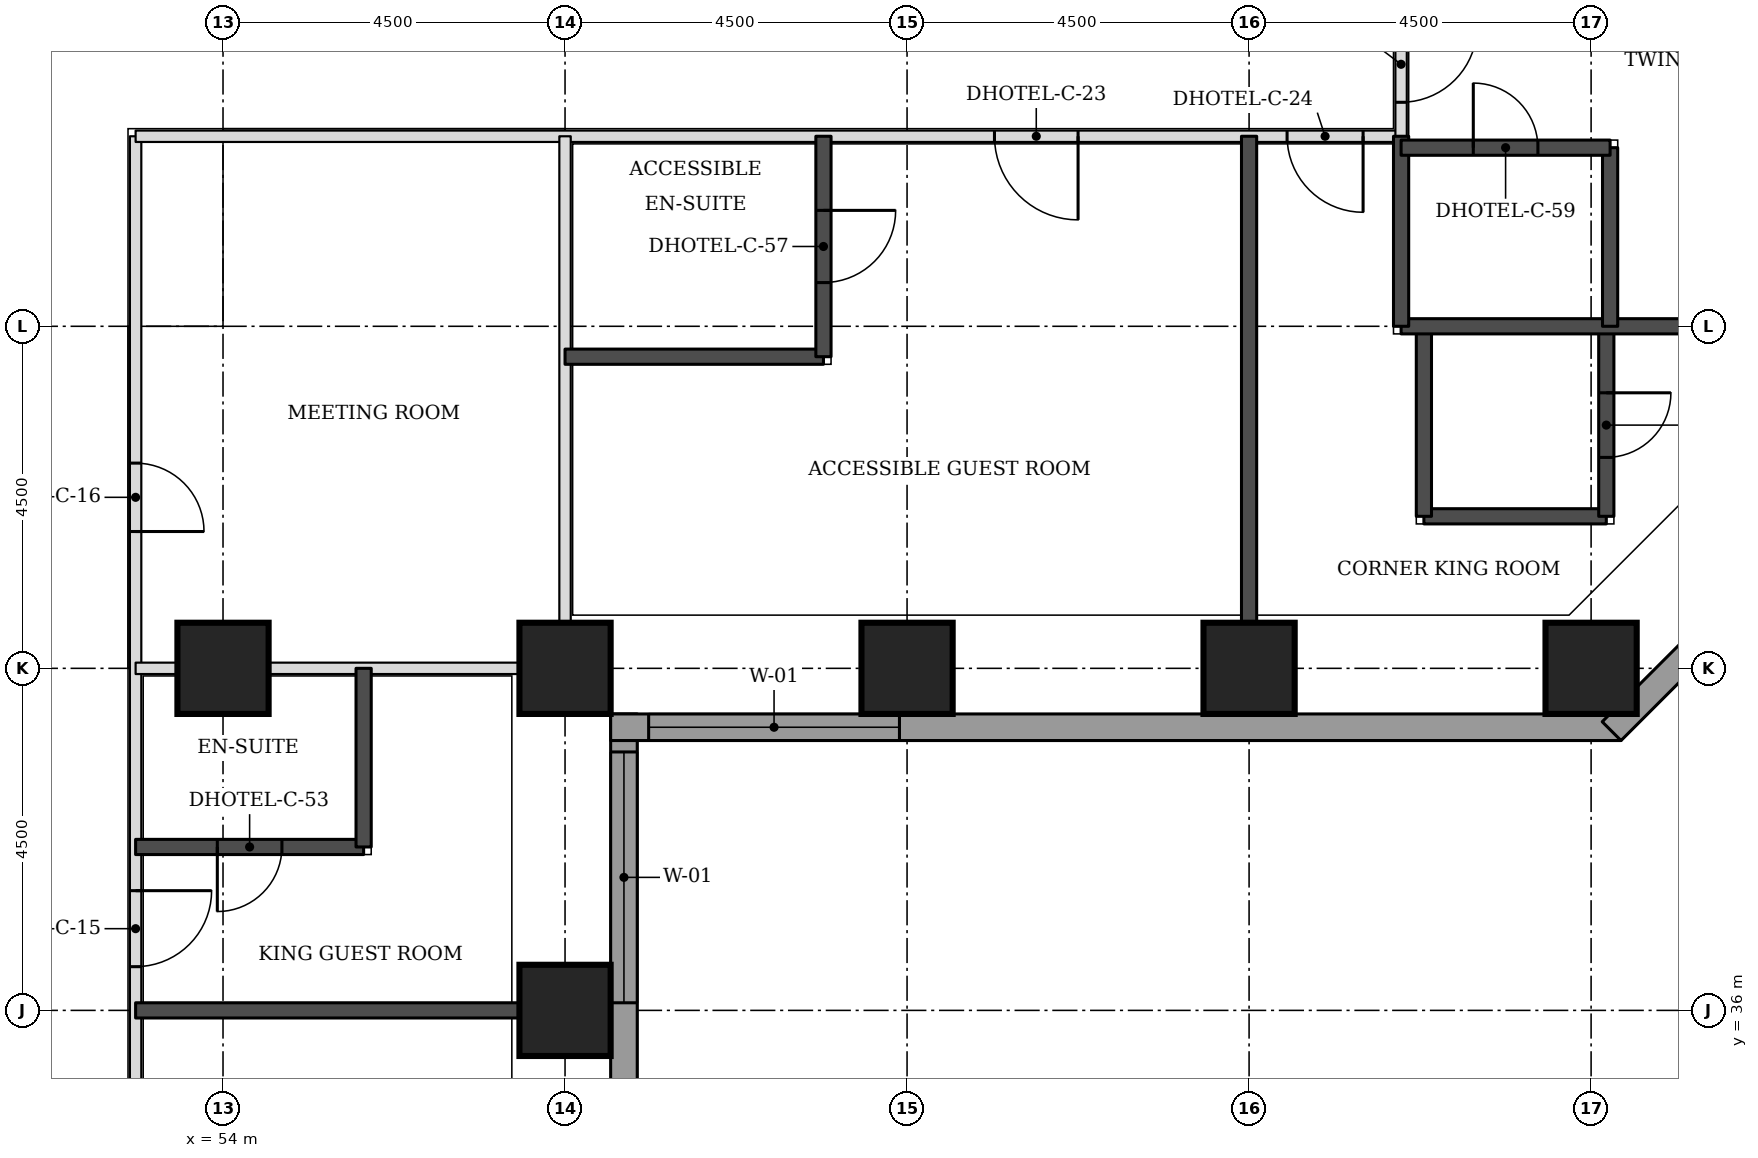
"""IFC4 building model, lengths in metres.
Left out: names, types, materials, properties, quantities, classifications, styles, units other than length and angle.
Written with IfcOpenShell. Run it as: python <this file> out.ifc"""

import sys

from ifc_helpers import new_model, si_unit, direction, frame, frame_2d, origin, origin_2d, place, context, subcontext, project, spatial, rectangle, extrude, element, fill, save


model = new_model("IFC4")
c1 = context("Model", 3, precision=1e-05, world=origin(), true_north=direction((0.0, 1.0)))
c2 = subcontext(c1, "Body", "Model", "MODEL_VIEW")
j1 = project(units=[si_unit("LENGTHUNIT", "METRE"), si_unit("PLANEANGLEUNIT", "RADIAN")], contexts=[c1])
p1 = place(None, origin())
s1 = spatial("IfcSite", under=j1, at=p1, CompositionType="ELEMENT")
p2 = place(p1, origin())
s2 = spatial("IfcBuilding", under=s1, at=p2, CompositionType="ELEMENT")
p3 = place(p2, frame((0.0, 0.0, 56.1)))
s3 = spatial("IfcBuildingStorey", under=s2, at=p3, CompositionType="ELEMENT", Elevation=56.1)
for number, where, z_axis, x_axis in (
    (1, (58.5, 36.0, 0.0), (0.0, 0.0, 1.0), (1.0, 0.0, 0.0)),
    (2, (54.0, 40.5, 0.0), (0.0, 0.0, 1.0), (1.0, 0.0, 0.0)),
    (3, (58.5, 40.5, 0.0), (0.0, 0.0, 1.0), (1.0, 0.0, 0.0)),
    (4, (63.0, 40.5, 0.0), (0.0, 0.0, 1.0), (1.0, 0.0, 0.0)),
    (5, (67.5, 40.5, 0.0), (0.0, 0.0, 1.0), (1.0, 0.0, 0.0)),
    (6, (72.0, 40.5, 0.0), (0.0, 0.0, 1.0), (1.0, 0.0, 0.0)),
):
    element("IfcColumn", number, at=place(p3, frame(where, z_axis=z_axis, x_axis=x_axis)), inside=s3, PredefinedType="COLUMN", context=c2, shape_type="SweptSolid", body=[
        extrude(rectangle(XDim=1.2, YDim=1.2, at=origin_2d()), origin(), (0.0, 0.0, 1.0), 3.3),
    ])
p4 = place(p3, frame((59.275, 22.106, 0.0), z_axis=(0.0, 0.0, 1.0), x_axis=(0.0, 1.0, 0.0)))
e7 = element("IfcWall", 7, at=p4, inside=s3, PredefinedType="STANDARD", context=c2, shape_type="SweptSolid", body=[
    extrude(rectangle(XDim=17.793, YDim=0.35, at=frame_2d((8.897, 0.0))), origin(), (0.0, 0.0, 1.0), 3.055),
])
p5 = place(p4, frame((5.493, 0.0, 0.8)))
e8 = element("IfcOpeningElement", 8, at=p5, cuts=e7, PredefinedType="OPENING", context=c2, shape_type="SweptSolid", body=[
    extrude(rectangle(XDim=3.3, YDim=1.5, at=frame_2d((1.65, 0.75))), frame((0.0, 0.185, 0.0), z_axis=(0.0, -1.0, 0.0), x_axis=(1.0, 0.0, 0.0)), (0.0, 0.0, 1.0), 0.37),
])
p6 = place(p4, frame((13.993, 0.0, 0.8)))
e9 = element("IfcOpeningElement", 9, at=p6, cuts=e7, PredefinedType="OPENING", context=c2, shape_type="SweptSolid", body=[
    extrude(rectangle(XDim=3.3, YDim=1.5, at=frame_2d((1.65, 0.75))), frame((0.0, 0.185, 0.0), z_axis=(0.0, -1.0, 0.0), x_axis=(1.0, 0.0, 0.0)), (0.0, 0.0, 1.0), 0.37),
])
p7 = place(p3, frame((59.1, 39.725, 0.0), z_axis=(0.0, 0.0, 1.0), x_axis=(1.0, 0.0, 0.0)))
e10 = element("IfcWall", 10, at=p7, inside=s3, PredefinedType="STANDARD", context=c2, shape_type="SweptSolid", body=[
    extrude(rectangle(XDim=13.293, YDim=0.35, at=frame_2d((6.647, 0.0))), origin(), (0.0, 0.0, 1.0), 3.055),
])
p8 = place(p7, frame((0.5, 0.0, 0.8)))
e11 = element("IfcOpeningElement", 11, at=p8, cuts=e10, PredefinedType="OPENING", context=c2, shape_type="SweptSolid", body=[
    extrude(rectangle(XDim=3.3, YDim=1.5, at=frame_2d((1.65, 0.75))), frame((0.0, 0.185, 0.0), z_axis=(0.0, -1.0, 0.0), x_axis=(1.0, 0.0, 0.0)), (0.0, 0.0, 1.0), 0.37),
])
p9 = place(p3, frame((72.27, 39.674, 0.0), z_axis=(0.0, 0.0, 1.0), x_axis=(0.707106781187, 0.707106781187, 0.0)))
e12 = element("IfcWall", 12, at=p9, inside=s3, PredefinedType="STANDARD", context=c2, shape_type="SweptSolid", body=[
    extrude(rectangle(XDim=7.151, YDim=0.35, at=frame_2d((3.576, 0.0))), origin(), (0.0, 0.0, 1.0), 3.055),
])
p10 = place(p9, frame((1.926, 0.0, 0.8)))
e13 = element("IfcOpeningElement", 13, at=p10, cuts=e12, PredefinedType="OPENING", context=c2, shape_type="SweptSolid", body=[
    extrude(rectangle(XDim=3.3, YDim=1.5, at=frame_2d((1.65, 0.75))), frame((0.0, 0.185, 0.0), z_axis=(0.0, -1.0, 0.0), x_axis=(1.0, 0.0, 0.0)), (0.0, 0.0, 1.0), 0.37),
])
p11 = place(p3, frame((52.85, 25.15, 0.0), z_axis=(0.0, 0.0, 1.0), x_axis=(0.0, 1.0, 0.0)))
e14 = element("IfcWall", 14, at=p11, inside=s3, PredefinedType="PARTITIONING", context=c2, shape_type="SweptSolid", body=[
    extrude(rectangle(XDim=22.35, YDim=0.15, at=frame_2d((11.175, 0.0))), origin(), (0.0, 0.0, 1.0), 3.08),
])
p12 = place(p11, frame((0.347, 0.0, 0.0)))
e15 = element("IfcOpeningElement", 15, at=p12, cuts=e14, PredefinedType="OPENING", context=c2, shape_type="SweptSolid", body=[
    extrude(rectangle(XDim=1.0, YDim=2.1, at=frame_2d((0.5, 1.05))), frame((0.0, 0.085, 0.0), z_axis=(0.0, -1.0, 0.0), x_axis=(1.0, 0.0, 0.0)), (0.0, 0.0, 1.0), 0.17),
])
p13 = place(p11, frame((7.075, 0.0, 0.0)))
e16 = element("IfcOpeningElement", 16, at=p13, cuts=e14, PredefinedType="OPENING", context=c2, shape_type="SweptSolid", body=[
    extrude(rectangle(XDim=1.0, YDim=2.1, at=frame_2d((0.5, 1.05))), frame((0.0, 0.085, 0.0), z_axis=(0.0, -1.0, 0.0), x_axis=(1.0, 0.0, 0.0)), (0.0, 0.0, 1.0), 0.17),
])
p14 = place(p11, frame((11.425, 0.0, 0.0)))
e17 = element("IfcOpeningElement", 17, at=p14, cuts=e14, PredefinedType="OPENING", context=c2, shape_type="SweptSolid", body=[
    extrude(rectangle(XDim=1.0, YDim=2.1, at=frame_2d((0.5, 1.05))), frame((0.0, 0.085, 0.0), z_axis=(0.0, -1.0, 0.0), x_axis=(1.0, 0.0, 0.0)), (0.0, 0.0, 1.0), 0.17),
])
p15 = place(p11, frame((17.15, 0.0, 0.0)))
e18 = element("IfcOpeningElement", 18, at=p15, cuts=e14, PredefinedType="OPENING", context=c2, shape_type="SweptSolid", body=[
    extrude(rectangle(XDim=0.9, YDim=2.1, at=frame_2d((0.45, 1.05))), frame((0.0, 0.085, 0.0), z_axis=(0.0, -1.0, 0.0), x_axis=(1.0, 0.0, 0.0)), (0.0, 0.0, 1.0), 0.17),
])
p16 = place(p3, frame((52.85, 47.5, 0.0), z_axis=(0.0, 0.0, 1.0), x_axis=(1.0, 0.0, 0.0)))
e19 = element("IfcWall", 19, at=p16, inside=s3, PredefinedType="PARTITIONING", context=c2, shape_type="SweptSolid", body=[
    extrude(rectangle(XDim=16.65, YDim=0.15, at=frame_2d((8.325, 0.0))), origin(), (0.0, 0.0, 1.0), 3.08),
])
p17 = place(p16, frame((11.3, 0.0, 0.0)))
e20 = element("IfcOpeningElement", 20, at=p17, cuts=e19, PredefinedType="OPENING", context=c2, shape_type="SweptSolid", body=[
    extrude(rectangle(XDim=1.1, YDim=2.1, at=frame_2d((0.55, 1.05))), frame((0.0, 0.085, 0.0), z_axis=(0.0, -1.0, 0.0), x_axis=(1.0, 0.0, 0.0)), (0.0, 0.0, 1.0), 0.17),
])
p18 = place(p16, frame((15.15, 0.0, 0.0)))
e21 = element("IfcOpeningElement", 21, at=p18, cuts=e19, PredefinedType="OPENING", context=c2, shape_type="SweptSolid", body=[
    extrude(rectangle(XDim=1.0, YDim=2.1, at=frame_2d((0.5, 1.05))), frame((0.0, 0.085, 0.0), z_axis=(0.0, -1.0, 0.0), x_axis=(1.0, 0.0, 0.0)), (0.0, 0.0, 1.0), 0.17),
])
p19 = place(p3, frame((69.5, 47.5, 0.0), z_axis=(0.0, 0.0, 1.0), x_axis=(0.0, 1.0, 0.0)))
e22 = element("IfcWall", 22, at=p19, inside=s3, PredefinedType="PARTITIONING", context=c2, shape_type="SweptSolid", body=[
    extrude(rectangle(XDim=26.5, YDim=0.15, at=frame_2d((13.25, 0.0))), origin(), (0.0, 0.0, 1.0), 3.08),
])
p20 = place(p19, frame((25.053, 0.0, 0.0)))
e23 = element("IfcOpeningElement", 23, at=p20, cuts=e22, PredefinedType="OPENING", context=c2, shape_type="SweptSolid", body=[
    extrude(rectangle(XDim=1.0, YDim=2.1, at=frame_2d((0.5, 1.05))), frame((0.0, 0.085, 0.0), z_axis=(0.0, -1.0, 0.0), x_axis=(1.0, 0.0, 0.0)), (0.0, 0.0, 1.0), 0.17),
])
p21 = place(p19, frame((18.275, 0.0, 0.0)))
e24 = element("IfcOpeningElement", 24, at=p21, cuts=e22, PredefinedType="OPENING", context=c2, shape_type="SweptSolid", body=[
    extrude(rectangle(XDim=1.0, YDim=2.1, at=frame_2d((0.5, 1.05))), frame((0.0, 0.085, 0.0), z_axis=(0.0, -1.0, 0.0), x_axis=(1.0, 0.0, 0.0)), (0.0, 0.0, 1.0), 0.17),
])
p22 = place(p19, frame((12.15, 0.0, 0.0)))
e25 = element("IfcOpeningElement", 25, at=p22, cuts=e22, PredefinedType="OPENING", context=c2, shape_type="SweptSolid", body=[
    extrude(rectangle(XDim=1.1, YDim=2.1, at=frame_2d((0.55, 1.05))), frame((0.0, 0.085, 0.0), z_axis=(0.0, -1.0, 0.0), x_axis=(1.0, 0.0, 0.0)), (0.0, 0.0, 1.0), 0.17),
])
p23 = place(p19, frame((2.825, 0.0, 0.0)))
e26 = element("IfcOpeningElement", 26, at=p23, cuts=e22, PredefinedType="OPENING", context=c2, shape_type="SweptSolid", body=[
    extrude(rectangle(XDim=1.0, YDim=2.1, at=frame_2d((0.5, 1.05))), frame((0.0, 0.085, 0.0), z_axis=(0.0, -1.0, 0.0), x_axis=(1.0, 0.0, 0.0)), (0.0, 0.0, 1.0), 0.17),
])
p24 = place(p19, frame((0.447, 0.0, 0.0)))
e27 = element("IfcOpeningElement", 27, at=p24, cuts=e22, PredefinedType="OPENING", context=c2, shape_type="SweptSolid", body=[
    extrude(rectangle(XDim=1.0, YDim=2.1, at=frame_2d((0.5, 1.05))), frame((0.0, 0.085, 0.0), z_axis=(0.0, -1.0, 0.0), x_axis=(1.0, 0.0, 0.0)), (0.0, 0.0, 1.0), 0.17),
])
p25 = place(p3, frame((52.85, 36.0, 0.0), z_axis=(0.0, 0.0, 1.0), x_axis=(1.0, 0.0, 0.0)))
e28 = element("IfcWall", 28, at=p25, inside=s3, PredefinedType="SOLIDWALL", context=c2, shape_type="SweptSolid", body=[
    extrude(rectangle(XDim=5.05, YDim=0.2, at=frame_2d((2.525, 0.0))), origin(), (0.0, 0.0, 1.0), 3.08),
])
p26 = place(p3, frame((52.85, 38.15, 0.0), z_axis=(0.0, 0.0, 1.0), x_axis=(1.0, 0.0, 0.0)))
e29 = element("IfcWall", 29, at=p26, inside=s3, PredefinedType="SOLIDWALL", context=c2, shape_type="SweptSolid", body=[
    extrude(rectangle(XDim=3.0, YDim=0.2, at=frame_2d((1.5, 0.0))), origin(), (0.0, 0.0, 1.0), 3.08),
])
p27 = place(p26, frame((1.075, 0.0, 0.0)))
e30 = element("IfcOpeningElement", 30, at=p27, cuts=e29, PredefinedType="OPENING", context=c2, shape_type="SweptSolid", body=[
    extrude(rectangle(XDim=0.85, YDim=2.1, at=frame_2d((0.425, 1.05))), frame((0.0, 0.11, 0.0), z_axis=(0.0, -1.0, 0.0), x_axis=(1.0, 0.0, 0.0)), (0.0, 0.0, 1.0), 0.22),
])
p28 = place(p3, frame((55.85, 38.15, 0.0), z_axis=(0.0, 0.0, 1.0), x_axis=(0.0, 1.0, 0.0)))
e31 = element("IfcWall", 31, at=p28, inside=s3, PredefinedType="SOLIDWALL", context=c2, shape_type="SweptSolid", body=[
    extrude(rectangle(XDim=2.35, YDim=0.2, at=frame_2d((1.175, 0.0))), origin(), (0.0, 0.0, 1.0), 3.08),
])
p29 = place(p3, frame((67.5, 41.1, 0.0), z_axis=(0.0, 0.0, 1.0), x_axis=(0.0, 1.0, 0.0)))
e32 = element("IfcWall", 32, at=p29, inside=s3, PredefinedType="SOLIDWALL", context=c2, shape_type="SweptSolid", body=[
    extrude(rectangle(XDim=6.4, YDim=0.2, at=frame_2d((3.2, 0.0))), origin(), (0.0, 0.0, 1.0), 3.08),
])
p30 = place(p3, frame((69.8, 42.5, 0.0), z_axis=(0.0, 0.0, 1.0), x_axis=(1.0, 0.0, 0.0)))
e33 = element("IfcWall", 33, at=p30, inside=s3, PredefinedType="SOLIDWALL", context=c2, shape_type="SweptSolid", body=[
    extrude(rectangle(XDim=2.4, YDim=0.2, at=frame_2d((1.2, 0.0))), origin(), (0.0, 0.0, 1.0), 3.08),
])
p31 = place(p3, frame((69.8, 42.5, 0.0), z_axis=(0.0, 0.0, 1.0), x_axis=(0.0, 1.0, 0.0)))
e34 = element("IfcWall", 34, at=p31, inside=s3, PredefinedType="SOLIDWALL", context=c2, shape_type="SweptSolid", body=[
    extrude(rectangle(XDim=2.5, YDim=0.2, at=frame_2d((1.25, 0.0))), origin(), (0.0, 0.0, 1.0), 3.08),
])
p32 = place(p3, frame((72.2, 42.5, 0.0), z_axis=(0.0, 0.0, 1.0), x_axis=(0.0, 1.0, 0.0)))
e35 = element("IfcWall", 35, at=p32, inside=s3, PredefinedType="SOLIDWALL", context=c2, shape_type="SweptSolid", body=[
    extrude(rectangle(XDim=2.5, YDim=0.2, at=frame_2d((1.25, 0.0))), origin(), (0.0, 0.0, 1.0), 3.08),
])
p33 = place(p32, frame((0.775, 0.0, 0.0)))
e36 = element("IfcOpeningElement", 36, at=p33, cuts=e35, PredefinedType="OPENING", context=c2, shape_type="SweptSolid", body=[
    extrude(rectangle(XDim=0.85, YDim=2.1, at=frame_2d((0.425, 1.05))), frame((0.0, 0.11, 0.0), z_axis=(0.0, -1.0, 0.0), x_axis=(1.0, 0.0, 0.0)), (0.0, 0.0, 1.0), 0.22),
])
p34 = place(p3, frame((58.5, 44.6, 0.0), z_axis=(0.0, 0.0, 1.0), x_axis=(1.0, 0.0, 0.0)))
e37 = element("IfcWall", 37, at=p34, inside=s3, PredefinedType="SOLIDWALL", context=c2, shape_type="SweptSolid", body=[
    extrude(rectangle(XDim=3.4, YDim=0.2, at=frame_2d((1.7, 0.0))), origin(), (0.0, 0.0, 1.0), 3.08),
])
p35 = place(p3, frame((61.9, 44.6, 0.0), z_axis=(0.0, 0.0, 1.0), x_axis=(0.0, 1.0, 0.0)))
e38 = element("IfcWall", 38, at=p35, inside=s3, PredefinedType="SOLIDWALL", context=c2, shape_type="SweptSolid", body=[
    extrude(rectangle(XDim=2.9, YDim=0.2, at=frame_2d((1.45, 0.0))), origin(), (0.0, 0.0, 1.0), 3.08),
])
p36 = place(p35, frame((0.975, 0.0, 0.0)))
e39 = element("IfcOpeningElement", 39, at=p36, cuts=e38, PredefinedType="OPENING", context=c2, shape_type="SweptSolid", body=[
    extrude(rectangle(XDim=0.95, YDim=2.1, at=frame_2d((0.475, 1.05))), frame((0.0, 0.11, 0.0), z_axis=(0.0, -1.0, 0.0), x_axis=(1.0, 0.0, 0.0)), (0.0, 0.0, 1.0), 0.22),
])
p37 = place(p3, frame((69.5, 45.0, 0.0), z_axis=(0.0, 0.0, 1.0), x_axis=(1.0, 0.0, 0.0)))
e40 = element("IfcWall", 40, at=p37, inside=s3, PredefinedType="SOLIDWALL", context=c2, shape_type="SweptSolid", body=[
    extrude(rectangle(XDim=6.4, YDim=0.2, at=frame_2d((3.2, 0.0))), origin(), (0.0, 0.0, 1.0), 3.08),
])
p38 = place(p3, frame((69.5, 45.0, 0.0), z_axis=(0.0, 0.0, 1.0), x_axis=(0.0, 1.0, 0.0)))
e41 = element("IfcWall", 41, at=p38, inside=s3, PredefinedType="SOLIDWALL", context=c2, shape_type="SweptSolid", body=[
    extrude(rectangle(XDim=2.5, YDim=0.2, at=frame_2d((1.25, 0.0))), origin(), (0.0, 0.0, 1.0), 3.08),
])
p39 = place(p3, frame((72.25, 45.0, 0.0), z_axis=(0.0, 0.0, 1.0), x_axis=(0.0, 1.0, 0.0)))
e42 = element("IfcWall", 42, at=p39, inside=s3, PredefinedType="SOLIDWALL", context=c2, shape_type="SweptSolid", body=[
    extrude(rectangle(XDim=2.35, YDim=0.2, at=frame_2d((1.175, 0.0))), origin(), (0.0, 0.0, 1.0), 3.08),
])
p40 = place(p3, frame((69.5, 47.35, 0.0), z_axis=(0.0, 0.0, 1.0), x_axis=(1.0, 0.0, 0.0)))
e43 = element("IfcWall", 43, at=p40, inside=s3, PredefinedType="SOLIDWALL", context=c2, shape_type="SweptSolid", body=[
    extrude(rectangle(XDim=2.75, YDim=0.2, at=frame_2d((1.375, 0.0))), origin(), (0.0, 0.0, 1.0), 3.08),
])
p41 = place(p40, frame((0.95, 0.0, 0.0)))
e44 = element("IfcOpeningElement", 44, at=p41, cuts=e43, PredefinedType="OPENING", context=c2, shape_type="SweptSolid", body=[
    extrude(rectangle(XDim=0.85, YDim=2.1, at=frame_2d((0.425, 1.05))), frame((0.0, 0.11, 0.0), z_axis=(0.0, -1.0, 0.0), x_axis=(1.0, 0.0, 0.0)), (0.0, 0.0, 1.0), 0.22),
])
p42 = place(p3, frame((52.85, 40.5, 0.0), z_axis=(0.0, 0.0, 1.0), x_axis=(1.0, 0.0, 0.0)))
e45 = element("IfcWall", 45, at=p42, inside=s3, PredefinedType="PARTITIONING", context=c2, shape_type="SweptSolid", body=[
    extrude(rectangle(XDim=5.05, YDim=0.15, at=frame_2d((2.525, 0.0))), origin(), (0.0, 0.0, 1.0), 2.33),
])
p43 = place(p3, frame((58.5, 41.1, 0.0), z_axis=(0.0, 0.0, 1.0), x_axis=(0.0, 1.0, 0.0)))
e46 = element("IfcWall", 46, at=p43, inside=s3, PredefinedType="PARTITIONING", context=c2, shape_type="SweptSolid", body=[
    extrude(rectangle(XDim=6.4, YDim=0.15, at=frame_2d((3.2, 0.0))), origin(), (0.0, 0.0, 1.0), 3.08),
])
p44 = place(p6, origin())
e47 = element("IfcWindow", 47, at=p44, inside=s3, PartitioningType="SINGLE_PANEL", PredefinedType="WINDOW", context=c2, shape_type="SweptSolid", body=[
    extrude(rectangle(XDim=3.3, YDim=1.5, at=frame_2d((1.65, 0.75))), frame((0.0, 0.085, 0.0), z_axis=(0.0, -1.0, 0.0), x_axis=(1.0, 0.0, 0.0)), (0.0, 0.0, 1.0), 0.06),
])
fill(e9, e47)
p45 = place(p8, origin())
e48 = element("IfcWindow", 48, at=p45, inside=s3, PartitioningType="SINGLE_PANEL", PredefinedType="WINDOW", context=c2, shape_type="SweptSolid", body=[
    extrude(rectangle(XDim=3.3, YDim=1.5, at=frame_2d((1.65, 0.75))), frame((0.0, 0.085, 0.0), z_axis=(0.0, -1.0, 0.0), x_axis=(1.0, 0.0, 0.0)), (0.0, 0.0, 1.0), 0.06),
])
fill(e11, e48)
p46 = place(p14, frame((1.0, 0.0, 0.0), z_axis=(0.0, 0.0, 1.0), x_axis=(-1.0, 0.0, 0.0)))
e49 = element("IfcDoor", 49, at=p46, inside=s3, OperationType="SINGLE_SWING_LEFT", PredefinedType="DOOR", context=c2, shape_type="SweptSolid", body=[
    extrude(rectangle(XDim=1.0, YDim=2.1, at=frame_2d((0.5, 1.05))), frame((0.0, 0.025, 0.0), z_axis=(0.0, -1.0, 0.0), x_axis=(1.0, 0.0, 0.0)), (0.0, 0.0, 1.0), 0.05),
])
fill(e17, e49)
p47 = place(p27, frame((0.85, 0.0, 0.0), z_axis=(0.0, 0.0, 1.0), x_axis=(-1.0, 0.0, 0.0)))
e50 = element("IfcDoor", 50, at=p47, inside=s3, OperationType="SINGLE_SWING_RIGHT", PredefinedType="DOOR", context=c2, shape_type="SweptSolid", body=[
    extrude(rectangle(XDim=0.85, YDim=2.1, at=frame_2d((0.425, 1.05))), frame((0.0, 0.025, 0.0), z_axis=(0.0, -1.0, 0.0), x_axis=(1.0, 0.0, 0.0)), (0.0, 0.0, 1.0), 0.05),
])
fill(e30, e50)
p48 = place(p24, frame((1.0, 0.0, 0.0), z_axis=(0.0, 0.0, 1.0), x_axis=(-1.0, 0.0, 0.0)))
e51 = element("IfcDoor", 51, at=p48, inside=s3, OperationType="SINGLE_SWING_LEFT", PredefinedType="DOOR", context=c2, shape_type="SweptSolid", body=[
    extrude(rectangle(XDim=1.0, YDim=2.1, at=frame_2d((0.5, 1.05))), frame((0.0, 0.025, 0.0), z_axis=(0.0, -1.0, 0.0), x_axis=(1.0, 0.0, 0.0)), (0.0, 0.0, 1.0), 0.05),
])
fill(e27, e51)
p49 = place(p41, origin())
e52 = element("IfcDoor", 52, at=p49, inside=s3, OperationType="SINGLE_SWING_LEFT", PredefinedType="DOOR", context=c2, shape_type="SweptSolid", body=[
    extrude(rectangle(XDim=0.85, YDim=2.1, at=frame_2d((0.425, 1.05))), frame((0.0, 0.025, 0.0), z_axis=(0.0, -1.0, 0.0), x_axis=(1.0, 0.0, 0.0)), (0.0, 0.0, 1.0), 0.05),
])
fill(e44, e52)
p50 = place(p17, frame((1.1, 0.0, 0.0), z_axis=(0.0, 0.0, 1.0), x_axis=(-1.0, 0.0, 0.0)))
e53 = element("IfcDoor", 53, at=p50, inside=s3, OperationType="SINGLE_SWING_LEFT", PredefinedType="DOOR", context=c2, shape_type="SweptSolid", body=[
    extrude(rectangle(XDim=1.1, YDim=2.1, at=frame_2d((0.55, 1.05))), frame((0.0, 0.025, 0.0), z_axis=(0.0, -1.0, 0.0), x_axis=(1.0, 0.0, 0.0)), (0.0, 0.0, 1.0), 0.05),
])
fill(e20, e53)
p51 = place(p36, frame((0.95, 0.0, 0.0), z_axis=(0.0, 0.0, 1.0), x_axis=(-1.0, 0.0, 0.0)))
e54 = element("IfcDoor", 54, at=p51, inside=s3, OperationType="SINGLE_SWING_LEFT", PredefinedType="DOOR", context=c2, shape_type="SweptSolid", body=[
    extrude(rectangle(XDim=0.95, YDim=2.1, at=frame_2d((0.475, 1.05))), frame((0.0, 0.025, 0.0), z_axis=(0.0, -1.0, 0.0), x_axis=(1.0, 0.0, 0.0)), (0.0, 0.0, 1.0), 0.05),
])
fill(e39, e54)
p52 = place(p18, frame((1.0, 0.0, 0.0), z_axis=(0.0, 0.0, 1.0), x_axis=(-1.0, 0.0, 0.0)))
e55 = element("IfcDoor", 55, at=p52, inside=s3, OperationType="SINGLE_SWING_LEFT", PredefinedType="DOOR", context=c2, shape_type="SweptSolid", body=[
    extrude(rectangle(XDim=1.0, YDim=2.1, at=frame_2d((0.5, 1.05))), frame((0.0, 0.025, 0.0), z_axis=(0.0, -1.0, 0.0), x_axis=(1.0, 0.0, 0.0)), (0.0, 0.0, 1.0), 0.05),
])
fill(e21, e55)
p53 = place(p33, frame((0.85, 0.0, 0.0), z_axis=(0.0, 0.0, 1.0), x_axis=(-1.0, 0.0, 0.0)))
e56 = element("IfcDoor", 56, at=p53, inside=s3, OperationType="SINGLE_SWING_LEFT", PredefinedType="DOOR", context=c2, shape_type="SweptSolid", body=[
    extrude(rectangle(XDim=0.85, YDim=2.1, at=frame_2d((0.425, 1.05))), frame((0.0, 0.025, 0.0), z_axis=(0.0, -1.0, 0.0), x_axis=(1.0, 0.0, 0.0)), (0.0, 0.0, 1.0), 0.05),
])
fill(e36, e56)
p54 = place(p15, frame((0.9, 0.0, 0.0), z_axis=(0.0, 0.0, 1.0), x_axis=(-1.0, 0.0, 0.0)))
e57 = element("IfcDoor", 57, at=p54, inside=s3, OperationType="SINGLE_SWING_RIGHT", PredefinedType="DOOR", context=c2, shape_type="SweptSolid", body=[
    extrude(rectangle(XDim=0.9, YDim=2.1, at=frame_2d((0.45, 1.05))), frame((0.0, 0.025, 0.0), z_axis=(0.0, -1.0, 0.0), x_axis=(1.0, 0.0, 0.0)), (0.0, 0.0, 1.0), 0.05),
])
fill(e18, e57)
save(model, sys.argv[1])
